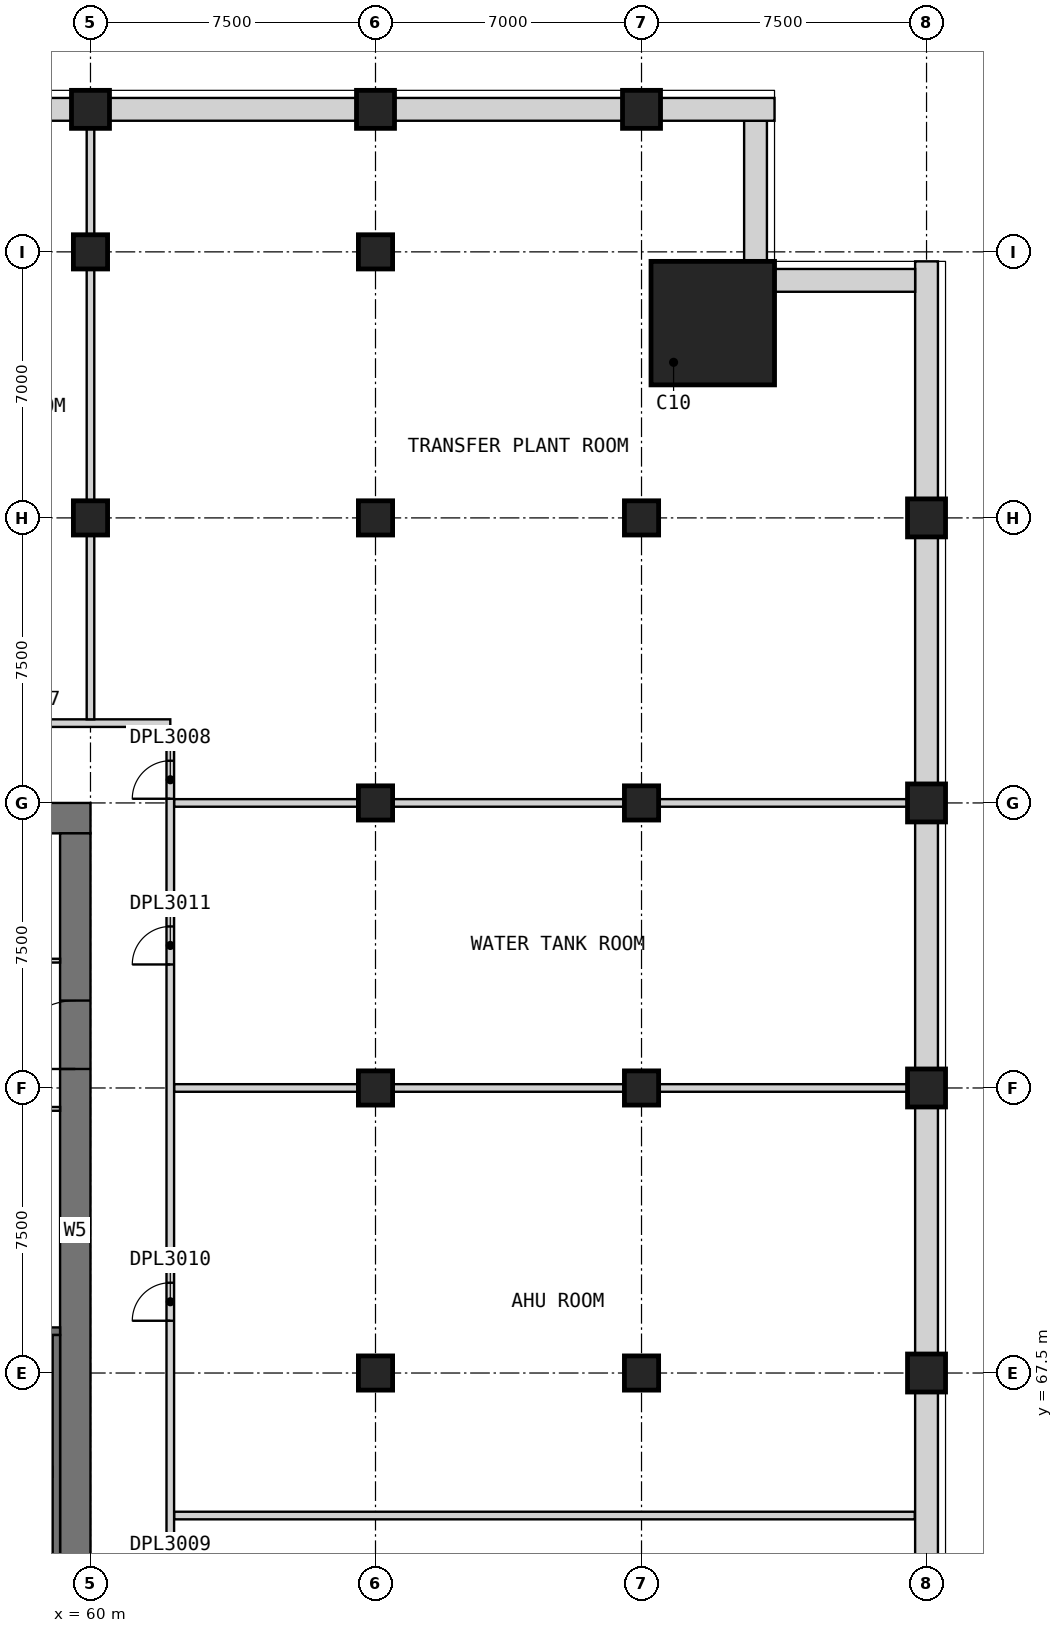
"""IFC4 building model, lengths in metres.
Left out: names, types, materials, properties, quantities, classifications, styles, units other than length and angle.
Written with IfcOpenShell. Run it as: python <this file> out.ifc"""

import sys

from ifc_helpers import new_model, si_unit, direction, frame, frame_2d, origin, origin_2d, place, context, subcontext, project, spatial, rectangle, extrude, element, fill, save


model = new_model("IFC4")
c1 = context("Model", 3, precision=1e-05, world=origin(), true_north=direction((0.0, 1.0)))
c2 = subcontext(c1, "Body", "Model", "MODEL_VIEW")
j1 = project(units=[si_unit("LENGTHUNIT", "METRE"), si_unit("PLANEANGLEUNIT", "RADIAN")], contexts=[c1])
p1 = place(None, origin())
s1 = spatial("IfcSite", under=j1, at=p1, CompositionType="ELEMENT")
p2 = place(p1, origin())
s2 = spatial("IfcBuilding", under=s1, at=p2, CompositionType="ELEMENT")
p3 = place(p2, frame((0.0, 0.0, 214.2)))
s3 = spatial("IfcBuildingStorey", under=s2, at=p3, CompositionType="ELEMENT", Elevation=214.2)
for number, where, z_axis, x_axis in (
    (1, (60.0, 100.75, 0.0), (0.0, 0.0, 1.0), (1.0, 0.0, 0.0)),
    (2, (67.5, 100.75, 0.0), (0.0, 0.0, 1.0), (1.0, 0.0, 0.0)),
    (3, (74.5, 100.75, 0.0), (0.0, 0.0, 1.0), (1.0, 0.0, 0.0)),
):
    element("IfcColumn", number, at=place(p3, frame(where, z_axis=z_axis, x_axis=x_axis)), inside=s3, PredefinedType="COLUMN", context=c2, shape_type="SweptSolid", body=[
        extrude(rectangle(XDim=1.0, YDim=1.0, at=origin_2d()), origin(), (0.0, 0.0, 1.0), 5.5),
    ])
for number, where, z_axis, x_axis in (
    (4, (60.0, 90.0, 0.0), (0.0, 0.0, 1.0), (1.0, 0.0, 0.0)),
    (5, (60.0, 97.0, 0.0), (0.0, 0.0, 1.0), (1.0, 0.0, 0.0)),
    (6, (67.5, 67.5, 0.0), (0.0, 0.0, 1.0), (1.0, 0.0, 0.0)),
    (7, (67.5, 75.0, 0.0), (0.0, 0.0, 1.0), (1.0, 0.0, 0.0)),
    (8, (67.5, 82.5, 0.0), (0.0, 0.0, 1.0), (1.0, 0.0, 0.0)),
    (9, (67.5, 90.0, 0.0), (0.0, 0.0, 1.0), (1.0, 0.0, 0.0)),
    (10, (67.5, 97.0, 0.0), (0.0, 0.0, 1.0), (1.0, 0.0, 0.0)),
    (11, (74.5, 67.5, 0.0), (0.0, 0.0, 1.0), (1.0, 0.0, 0.0)),
    (12, (74.5, 75.0, 0.0), (0.0, 0.0, 1.0), (1.0, 0.0, 0.0)),
    (13, (74.5, 82.5, 0.0), (0.0, 0.0, 1.0), (1.0, 0.0, 0.0)),
    (14, (74.5, 90.0, 0.0), (0.0, 0.0, 1.0), (1.0, 0.0, 0.0)),
):
    element("IfcColumn", number, at=place(p3, frame(where, z_axis=z_axis, x_axis=x_axis)), inside=s3, PredefinedType="COLUMN", context=c2, shape_type="SweptSolid", body=[
        extrude(rectangle(XDim=0.9, YDim=0.9, at=origin_2d()), origin(), (0.0, 0.0, 1.0), 5.5),
    ])
for number, where, z_axis, x_axis in (
    (15, (82.0, 67.5, 0.0), (0.0, 0.0, 1.0), (1.0, 0.0, 0.0)),
    (16, (82.0, 75.0, 0.0), (0.0, 0.0, 1.0), (1.0, 0.0, 0.0)),
    (17, (82.0, 82.5, 0.0), (0.0, 0.0, 1.0), (1.0, 0.0, 0.0)),
    (18, (82.0, 90.0, 0.0), (0.0, 0.0, 1.0), (1.0, 0.0, 0.0)),
):
    element("IfcColumn", number, at=place(p3, frame(where, z_axis=z_axis, x_axis=x_axis)), inside=s3, PredefinedType="COLUMN", context=c2, shape_type="SweptSolid", body=[
        extrude(rectangle(XDim=1.0, YDim=1.0, at=origin_2d()), origin(), (0.0, 0.0, 1.0), 5.5),
    ])
p4 = place(p3, frame((76.375, 95.125, 0.0), z_axis=(0.0, 0.0, 1.0), x_axis=(-1.0, 0.0, 0.0)))
e19 = element("IfcColumn", 19, at=p4, inside=s3, PredefinedType="COLUMN", context=c2, shape_type="SweptSolid", body=[
    extrude(rectangle(XDim=3.25, YDim=3.25, at=origin_2d()), origin(), (0.331, 0.331, 0.883), 6.226),
])
p5 = place(p3, frame((30.0, 82.1, 0.0), z_axis=(0.0, 0.0, 1.0), x_axis=(1.0, 0.0, 0.0)))
e20 = element("IfcWall", 20, at=p5, inside=s3, PredefinedType="SHEAR", context=c2, shape_type="SweptSolid", body=[
    extrude(rectangle(XDim=30.0, YDim=0.8, at=frame_2d((15.0, 0.0))), origin(), (0.0, 0.0, 1.0), 5.5),
])
p6 = place(p3, frame((59.6, 60.8, 0.0), z_axis=(0.0, 0.0, 1.0), x_axis=(0.0, 1.0, 0.0)))
e21 = element("IfcWall", 21, at=p6, inside=s3, PredefinedType="SHEAR", context=c2, shape_type="SweptSolid", body=[
    extrude(rectangle(XDim=20.9, YDim=0.8, at=frame_2d((10.45, 0.0))), origin(), (0.0, 0.0, 1.0), 5.5),
])
p7 = place(p6, frame((14.7, 0.0, 0.0)))
e22 = element("IfcOpeningElement", 22, at=p7, cuts=e21, PredefinedType="OPENING", context=c2, shape_type="SweptSolid", body=[
    extrude(rectangle(XDim=1.8, YDim=2.1, at=frame_2d((0.9, 1.05))), frame((0.0, 0.41, 0.0), z_axis=(0.0, -1.0, 0.0), x_axis=(1.0, 0.0, 0.0)), (0.0, 0.0, 1.0), 0.82),
])
for number, where, z_axis, x_axis in (
    (23, (82.0, 60.5, 0.0), (0.0, 0.0, 1.0), (0.0, 1.0, 0.0)),
    (24, (82.0, 68.0, 0.0), (0.0, 0.0, 1.0), (0.0, 1.0, 0.0)),
    (25, (82.0, 75.5, 0.0), (0.0, 0.0, 1.0), (0.0, 1.0, 0.0)),
    (26, (82.0, 83.0, 0.0), (0.0, 0.0, 1.0), (0.0, 1.0, 0.0)),
):
    element("IfcWall", number, at=place(p3, frame(where, z_axis=z_axis, x_axis=x_axis)), inside=s3, PredefinedType="ELEMENTEDWALL", context=c2, shape_type="SweptSolid", body=[
        extrude(rectangle(XDim=6.5, YDim=0.6, at=frame_2d((3.25, 0.0))), origin(), (0.0, 0.0, 1.0), 5.25),
    ])
p8 = place(p3, frame((82.0, 90.5, 0.0), z_axis=(0.0, 0.0, 1.0), x_axis=(0.0, 1.0, 0.0)))
e27 = element("IfcWall", 27, at=p8, inside=s3, PredefinedType="ELEMENTEDWALL", context=c2, shape_type="SweptSolid", body=[
    extrude(rectangle(XDim=6.25, YDim=0.6, at=frame_2d((3.125, 0.0))), origin(), (0.0, 0.0, 1.0), 5.25),
])
for number, where, z_axis, x_axis in (
    (28, (81.7, 96.25, 0.0), (0.0, 0.0, 1.0), (-1.0, 0.0, 0.0)),
    (29, (77.5, 96.75, 0.0), (0.0, 0.0, 1.0), (0.0, 1.0, 0.0)),
):
    element("IfcWall", number, at=place(p3, frame(where, z_axis=z_axis, x_axis=x_axis)), inside=s3, PredefinedType="ELEMENTEDWALL", context=c2, shape_type="SweptSolid", body=[
        extrude(rectangle(XDim=3.7, YDim=0.6, at=frame_2d((1.85, 0.0))), origin(), (0.0, 0.0, 1.0), 5.25),
    ])
p9 = place(p3, frame((78.0, 100.75, 0.0), z_axis=(0.0, 0.0, 1.0), x_axis=(-1.0, 0.0, 0.0)))
e30 = element("IfcWall", 30, at=p9, inside=s3, PredefinedType="ELEMENTEDWALL", context=c2, shape_type="SweptSolid", body=[
    extrude(rectangle(XDim=3.0, YDim=0.6, at=frame_2d((1.5, 0.0))), origin(), (0.0, 0.0, 1.0), 5.25),
])
p10 = place(p3, frame((74.0, 100.75, 0.0), z_axis=(0.0, 0.0, 1.0), x_axis=(-1.0, 0.0, 0.0)))
e31 = element("IfcWall", 31, at=p10, inside=s3, PredefinedType="ELEMENTEDWALL", context=c2, shape_type="SweptSolid", body=[
    extrude(rectangle(XDim=6.0, YDim=0.6, at=frame_2d((3.0, 0.0))), origin(), (0.0, 0.0, 1.0), 5.25),
])
for number, where, z_axis, x_axis in (
    (32, (67.0, 100.75, 0.0), (0.0, 0.0, 1.0), (-1.0, 0.0, 0.0)),
    (33, (59.5, 100.75, 0.0), (0.0, 0.0, 1.0), (-1.0, 0.0, 0.0)),
):
    element("IfcWall", number, at=place(p3, frame(where, z_axis=z_axis, x_axis=x_axis)), inside=s3, PredefinedType="ELEMENTEDWALL", context=c2, shape_type="SweptSolid", body=[
        extrude(rectangle(XDim=6.5, YDim=0.6, at=frame_2d((3.25, 0.0))), origin(), (0.0, 0.0, 1.0), 5.25),
    ])
p11 = place(p3, frame((51.1, 68.6, 0.0), z_axis=(0.0, 0.0, 1.0), x_axis=(1.0, 0.0, 0.0)))
e34 = element("IfcWall", 34, at=p11, inside=s3, PredefinedType="SOLIDWALL", context=c2, shape_type="SweptSolid", body=[
    extrude(rectangle(XDim=8.1, YDim=0.2, at=frame_2d((4.05, 0.0))), origin(), (0.0, 0.0, 1.0), 5.25),
])
p12 = place(p3, frame((59.1, 60.8, 0.0), z_axis=(0.0, 0.0, 1.0), x_axis=(0.0, 1.0, 0.0)))
e35 = element("IfcWall", 35, at=p12, inside=s3, PredefinedType="SOLIDWALL", context=c2, shape_type="SweptSolid", body=[
    extrude(rectangle(XDim=7.7, YDim=0.2, at=frame_2d((3.85, 0.0))), origin(), (0.0, 0.0, 1.0), 5.25),
])
p13 = place(p3, frame((51.1, 74.45, 0.0), z_axis=(0.0, 0.0, 1.0), x_axis=(1.0, 0.0, 0.0)))
e36 = element("IfcWall", 36, at=p13, inside=s3, PredefinedType="PARTITIONING", context=c2, shape_type="SweptSolid", body=[
    extrude(rectangle(XDim=8.1, YDim=0.1, at=frame_2d((4.05, 0.0))), origin(), (0.0, 0.0, 1.0), 5.25),
])
p14 = place(p13, frame((3.6, 0.0, 0.0)))
e37 = element("IfcOpeningElement", 37, at=p14, cuts=e36, PredefinedType="OPENING", context=c2, shape_type="SweptSolid", body=[
    extrude(rectangle(XDim=0.9, YDim=2.1, at=frame_2d((0.45, 1.05))), frame((0.0, 0.06, 0.0), z_axis=(0.0, -1.0, 0.0), x_axis=(1.0, 0.0, 0.0)), (0.0, 0.0, 1.0), 0.12),
])
p15 = place(p3, frame((51.1, 78.35, 0.0), z_axis=(0.0, 0.0, 1.0), x_axis=(1.0, 0.0, 0.0)))
e38 = element("IfcWall", 38, at=p15, inside=s3, PredefinedType="PARTITIONING", context=c2, shape_type="SweptSolid", body=[
    extrude(rectangle(XDim=8.1, YDim=0.1, at=frame_2d((4.05, 0.0))), origin(), (0.0, 0.0, 1.0), 5.25),
])
p16 = place(p15, frame((0.9, 0.0, 0.0)))
e39 = element("IfcOpeningElement", 39, at=p16, cuts=e38, PredefinedType="OPENING", context=c2, shape_type="SweptSolid", body=[
    extrude(rectangle(XDim=0.9, YDim=2.1, at=frame_2d((0.45, 1.05))), frame((0.0, 0.06, 0.0), z_axis=(0.0, -1.0, 0.0), x_axis=(1.0, 0.0, 0.0)), (0.0, 0.0, 1.0), 0.12),
])
p17 = place(p15, frame((4.95, 0.0, 0.0)))
e40 = element("IfcOpeningElement", 40, at=p17, cuts=e38, PredefinedType="OPENING", context=c2, shape_type="SweptSolid", body=[
    extrude(rectangle(XDim=0.9, YDim=2.1, at=frame_2d((0.45, 1.05))), frame((0.0, 0.06, 0.0), z_axis=(0.0, -1.0, 0.0), x_axis=(1.0, 0.0, 0.0)), (0.0, 0.0, 1.0), 0.12),
])
p18 = place(p3, frame((62.2, 63.75, 0.0), z_axis=(0.0, 0.0, 1.0), x_axis=(1.0, 0.0, 0.0)))
e41 = element("IfcWall", 41, at=p18, inside=s3, PredefinedType="PARTITIONING", context=c2, shape_type="SweptSolid", body=[
    extrude(rectangle(XDim=19.49, YDim=0.2, at=frame_2d((9.745, 0.0))), origin(), (0.0, 0.0, 1.0), 5.25),
])
for number, where, z_axis, x_axis in (
    (42, (62.2, 75.0, 0.0), (0.0, 0.0, 1.0), (1.0, 0.0, 0.0)),
    (43, (62.2, 82.5, 0.0), (0.0, 0.0, 1.0), (1.0, 0.0, 0.0)),
):
    element("IfcWall", number, at=place(p3, frame(where, z_axis=z_axis, x_axis=x_axis)), inside=s3, PredefinedType="PARTITIONING", context=c2, shape_type="SweptSolid", body=[
        extrude(rectangle(XDim=20.3, YDim=0.2, at=frame_2d((10.15, 0.0))), origin(), (0.0, 0.0, 1.0), 4.0),
    ])
p19 = place(p3, frame((33.75, 84.6, 0.0), z_axis=(0.0, 0.0, 1.0), x_axis=(1.0, 0.0, 0.0)))
e44 = element("IfcWall", 44, at=p19, inside=s3, PredefinedType="PARTITIONING", context=c2, shape_type="SweptSolid", body=[
    extrude(rectangle(XDim=28.35, YDim=0.2, at=frame_2d((14.175, 0.0))), origin(), (0.0, 0.0, 1.0), 5.25),
])
p20 = place(p19, frame((3.25, 0.0, 0.0)))
e45 = element("IfcOpeningElement", 45, at=p20, cuts=e44, PredefinedType="OPENING", context=c2, shape_type="SweptSolid", body=[
    extrude(rectangle(XDim=1.0, YDim=2.1, at=frame_2d((0.5, 1.05))), frame((0.0, 0.11, 0.0), z_axis=(0.0, -1.0, 0.0), x_axis=(1.0, 0.0, 0.0)), (0.0, 0.0, 1.0), 0.22),
])
p21 = place(p19, frame((14.5, 0.0, 0.0)))
e46 = element("IfcOpeningElement", 46, at=p21, cuts=e44, PredefinedType="OPENING", context=c2, shape_type="SweptSolid", body=[
    extrude(rectangle(XDim=1.0, YDim=2.1, at=frame_2d((0.5, 1.05))), frame((0.0, 0.11, 0.0), z_axis=(0.0, -1.0, 0.0), x_axis=(1.0, 0.0, 0.0)), (0.0, 0.0, 1.0), 0.22),
])
p22 = place(p19, frame((23.875, 0.0, 0.0)))
e47 = element("IfcOpeningElement", 47, at=p22, cuts=e44, PredefinedType="OPENING", context=c2, shape_type="SweptSolid", body=[
    extrude(rectangle(XDim=1.0, YDim=2.1, at=frame_2d((0.5, 1.05))), frame((0.0, 0.11, 0.0), z_axis=(0.0, -1.0, 0.0), x_axis=(1.0, 0.0, 0.0)), (0.0, 0.0, 1.0), 0.22),
])
p23 = place(p3, frame((60.0, 84.7, 0.0), z_axis=(0.0, 0.0, 1.0), x_axis=(0.0, 1.0, 0.0)))
e48 = element("IfcWall", 48, at=p23, inside=s3, PredefinedType="PARTITIONING", context=c2, shape_type="SweptSolid", body=[
    extrude(rectangle(XDim=16.55, YDim=0.2, at=frame_2d((8.275, 0.0))), origin(), (0.0, 0.0, 1.0), 5.25),
])
p24 = place(p3, frame((62.1, 58.0, 0.0), z_axis=(0.0, 0.0, 1.0), x_axis=(0.0, 1.0, 0.0)))
e49 = element("IfcWall", 49, at=p24, inside=s3, PredefinedType="PARTITIONING", context=c2, shape_type="SweptSolid", body=[
    extrude(rectangle(XDim=26.5, YDim=0.2, at=frame_2d((13.25, 0.0))), origin(), (0.0, 0.0, 1.0), 5.25),
])
p25 = place(p24, frame((24.61, 0.0, 0.0)))
e50 = element("IfcOpeningElement", 50, at=p25, cuts=e49, PredefinedType="OPENING", context=c2, shape_type="SweptSolid", body=[
    extrude(rectangle(XDim=1.0, YDim=2.1, at=frame_2d((0.5, 1.05))), frame((0.0, 0.11, 0.0), z_axis=(0.0, -1.0, 0.0), x_axis=(1.0, 0.0, 0.0)), (0.0, 0.0, 1.0), 0.22),
])
p26 = place(p24, frame((3.375, 0.0, 0.0)))
e51 = element("IfcOpeningElement", 51, at=p26, cuts=e49, PredefinedType="OPENING", context=c2, shape_type="SweptSolid", body=[
    extrude(rectangle(XDim=1.0, YDim=2.1, at=frame_2d((0.5, 1.05))), frame((0.0, 0.11, 0.0), z_axis=(0.0, -1.0, 0.0), x_axis=(1.0, 0.0, 0.0)), (0.0, 0.0, 1.0), 0.22),
])
p27 = place(p24, frame((10.875, 0.0, 0.0)))
e52 = element("IfcOpeningElement", 52, at=p27, cuts=e49, PredefinedType="OPENING", context=c2, shape_type="SweptSolid", body=[
    extrude(rectangle(XDim=1.0, YDim=2.1, at=frame_2d((0.5, 1.05))), frame((0.0, 0.11, 0.0), z_axis=(0.0, -1.0, 0.0), x_axis=(1.0, 0.0, 0.0)), (0.0, 0.0, 1.0), 0.22),
])
p28 = place(p24, frame((20.25, 0.0, 0.0)))
e53 = element("IfcOpeningElement", 53, at=p28, cuts=e49, PredefinedType="OPENING", context=c2, shape_type="SweptSolid", body=[
    extrude(rectangle(XDim=1.0, YDim=2.1, at=frame_2d((0.5, 1.05))), frame((0.0, 0.11, 0.0), z_axis=(0.0, -1.0, 0.0), x_axis=(1.0, 0.0, 0.0)), (0.0, 0.0, 1.0), 0.22),
])
p29 = place(p7, origin())
e54 = element("IfcDoor", 54, at=p29, inside=s3, OperationType="DOUBLE_DOOR_SINGLE_SWING", PredefinedType="DOOR", context=c2, shape_type="SweptSolid", body=[
    extrude(rectangle(XDim=1.8, YDim=2.1, at=frame_2d((0.9, 1.05))), frame((0.0, 0.025, 0.0), z_axis=(0.0, -1.0, 0.0), x_axis=(1.0, 0.0, 0.0)), (0.0, 0.0, 1.0), 0.05),
])
fill(e22, e54)
p30 = place(p25, origin())
e55 = element("IfcDoor", 55, at=p30, inside=s3, OperationType="SINGLE_SWING_RIGHT", PredefinedType="DOOR", context=c2, shape_type="SweptSolid", body=[
    extrude(rectangle(XDim=1.0, YDim=2.1, at=frame_2d((0.5, 1.05))), frame((0.0, 0.025, 0.0), z_axis=(0.0, -1.0, 0.0), x_axis=(1.0, 0.0, 0.0)), (0.0, 0.0, 1.0), 0.05),
])
fill(e50, e55)
p31 = place(p27, origin())
e56 = element("IfcDoor", 56, at=p31, inside=s3, OperationType="SINGLE_SWING_RIGHT", PredefinedType="DOOR", context=c2, shape_type="SweptSolid", body=[
    extrude(rectangle(XDim=1.0, YDim=2.1, at=frame_2d((0.5, 1.05))), frame((0.0, 0.025, 0.0), z_axis=(0.0, -1.0, 0.0), x_axis=(1.0, 0.0, 0.0)), (0.0, 0.0, 1.0), 0.05),
])
fill(e52, e56)
p32 = place(p28, origin())
e57 = element("IfcDoor", 57, at=p32, inside=s3, OperationType="SINGLE_SWING_RIGHT", PredefinedType="DOOR", context=c2, shape_type="SweptSolid", body=[
    extrude(rectangle(XDim=1.0, YDim=2.1, at=frame_2d((0.5, 1.05))), frame((0.0, 0.025, 0.0), z_axis=(0.0, -1.0, 0.0), x_axis=(1.0, 0.0, 0.0)), (0.0, 0.0, 1.0), 0.05),
])
fill(e53, e57)
save(model, sys.argv[1])
